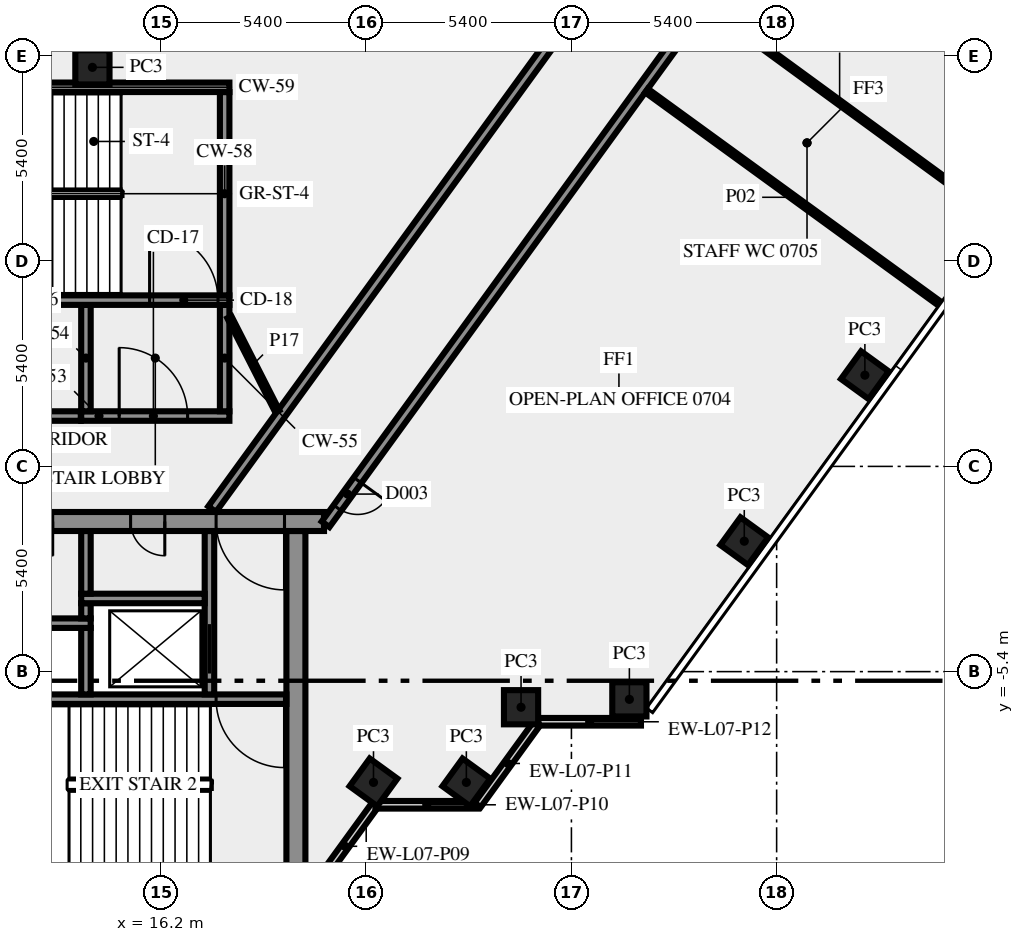
"""IFC4 building model, lengths in metres.
Left out: names, types, materials, properties, quantities, classifications, styles, units other than length and angle.
Written with IfcOpenShell. Run it as: python <this file> out.ifc"""

import sys

from ifc_helpers import new_model, si_unit, direction, frame, frame_2d, origin, origin_2d, place, context, subcontext, project, spatial, rectangle, extrude, element, fill, save


model = new_model("IFC4")
c1 = context("Model", 3, precision=1e-05, world=origin(), true_north=direction((0.0, 1.0)))
c2 = subcontext(c1, "Body", "Model", "MODEL_VIEW")
j1 = project(units=[si_unit("LENGTHUNIT", "METRE"), si_unit("PLANEANGLEUNIT", "RADIAN")], contexts=[c1])
p1 = place(None, origin())
s1 = spatial("IfcSite", under=j1, at=p1, CompositionType="ELEMENT")
p2 = place(p1, origin())
s2 = spatial("IfcBuilding", under=s1, at=p2, CompositionType="ELEMENT")
p3 = place(p2, frame((0.0, 0.0, 35.0)))
s3 = spatial("IfcBuildingStorey", under=s2, at=p3, CompositionType="ELEMENT", Elevation=35.0)
for number, where, z_axis, x_axis in (
    (1, (21.792, -8.315, 0.0), (0.0, 0.0, 1.0), (0.588, 0.809, 0.0)),
    (2, (24.235, -8.315, 0.0), (0.0, 0.0, 1.0), (0.588, 0.809, 0.0)),
    (3, (25.674, -6.337, 0.0), (0.0, 0.0, 1.0), (1.0, 0.0, 0.0)),
    (4, (28.525, -6.13, 0.0), (0.0, 0.0, 1.0), (1.0, 0.0, 0.0)),
    (5, (31.548, -1.969, 0.0), (0.0, 0.0, 1.0), (0.588, 0.809, 0.0)),
    (6, (34.722, 2.4, 0.0), (0.0, 0.0, 1.0), (0.588, 0.809, 0.0)),
    (7, (14.395, 10.5, 0.0), (0.0, 0.0, 1.0), (-1.0, 0.0, 0.0)),
):
    element("IfcColumn", number, at=place(p3, frame(where, z_axis=z_axis, x_axis=x_axis)), inside=s3, PredefinedType="COLUMN", context=c2, shape_type="SweptSolid", body=[
        extrude(rectangle(XDim=0.9, YDim=0.9, at=origin_2d()), origin(), (0.0, 0.0, 1.0), 3.65),
    ])
p4 = place(p3, frame((20.253, -11.083, 0.0), z_axis=(0.0, 0.0, 1.0), x_axis=(0.587766567315, 0.809030569476, 0.0)))
e8 = element("IfcWall", 8, at=p4, inside=s3, PredefinedType="SOLIDWALL", context=c2, shape_type="SweptSolid", body=[
    extrude(rectangle(XDim=2.688, YDim=0.2, at=frame_2d((1.344, 0.0))), origin(), (0.0, 0.0, 1.0), 3.65),
])
p5 = place(p3, frame((21.843, -8.904, 0.0), z_axis=(0.0, 0.0, 1.0), x_axis=(1.0, 0.0, 0.0)))
e9 = element("IfcWall", 9, at=p5, inside=s3, PredefinedType="SOLIDWALL", context=c2, shape_type="SweptSolid", body=[
    extrude(rectangle(XDim=2.7, YDim=0.2, at=frame_2d((1.35, 0.0))), origin(), (0.0, 0.0, 1.0), 3.65),
])
p6 = place(p3, frame((24.533, -8.909, 0.0), z_axis=(0.0, 0.0, 1.0), x_axis=(0.587720002413, 0.809064397168, 0.0)))
e10 = element("IfcWall", 10, at=p6, inside=s3, PredefinedType="SOLIDWALL", context=c2, shape_type="SweptSolid", body=[
    extrude(rectangle(XDim=2.7, YDim=0.2, at=frame_2d((1.35, 0.0))), origin(), (0.0, 0.0, 1.0), 3.65),
])
p7 = place(p3, frame((26.13, -6.719, 0.0), z_axis=(0.0, 0.0, 1.0), x_axis=(1.0, 0.0, 0.0)))
e11 = element("IfcWall", 11, at=p7, inside=s3, PredefinedType="SOLIDWALL", context=c2, shape_type="SweptSolid", body=[
    extrude(rectangle(XDim=2.7, YDim=0.2, at=frame_2d((1.35, 0.0))), origin(), (0.0, 0.0, 1.0), 3.65),
])
p8 = place(p3, frame((19.75, -10.5, 0.0), z_axis=(0.0, 0.0, 1.0), x_axis=(0.0, 1.0, 0.0)))
e12 = element("IfcWall", 12, at=p8, inside=s3, PredefinedType="SHEAR", context=c2, shape_type="SweptSolid", body=[
    extrude(rectangle(XDim=8.8, YDim=0.5, at=frame_2d((4.4, 0.0))), origin(), (0.0, 0.0, 1.0), 3.65),
])
p9 = place(p3, frame((19.5, -6.125, 0.0), z_axis=(0.0, 0.0, 1.0), x_axis=(-1.0, 0.0, 0.0)))
e13 = element("IfcWall", 13, at=p9, inside=s3, PredefinedType="SHEAR", context=c2, shape_type="SweptSolid", body=[
    extrude(rectangle(XDim=8.05, YDim=0.25, at=frame_2d((4.025, 0.0))), origin(), (0.0, 0.0, 1.0), 3.65),
])
p10 = place(p9, frame((0.05, 0.0, 0.0)))
e14 = element("IfcOpeningElement", 14, at=p10, cuts=e13, PredefinedType="OPENING", context=c2, shape_type="SweptSolid", body=[
    extrude(rectangle(XDim=1.8, YDim=2.1, at=frame_2d((0.9, 1.05))), frame((0.0, 0.135, 0.0), z_axis=(0.0, -1.0, 0.0), x_axis=(1.0, 0.0, 0.0)), (0.0, 0.0, 1.0), 0.27),
])
p11 = place(p3, frame((14.225, -6.0, 0.0), z_axis=(0.0, 0.0, 1.0), x_axis=(0.0, 1.0, 0.0)))
e15 = element("IfcWall", 15, at=p11, inside=s3, PredefinedType="SHEAR", context=c2, shape_type="SweptSolid", body=[
    extrude(rectangle(XDim=1.75, YDim=0.25, at=frame_2d((0.875, 0.0))), origin(), (0.0, 0.0, 1.0), 3.65),
])
p12 = place(p3, frame((17.475, -6.0, 0.0), z_axis=(0.0, 0.0, 1.0), x_axis=(0.0, 1.0, 0.0)))
e16 = element("IfcWall", 16, at=p12, inside=s3, PredefinedType="SHEAR", context=c2, shape_type="SweptSolid", body=[
    extrude(rectangle(XDim=4.3, YDim=0.25, at=frame_2d((2.15, 0.0))), origin(), (0.0, 0.0, 1.0), 3.65),
])
p13 = place(p12, frame((0.55, 0.0, 0.0)))
e17 = element("IfcOpeningElement", 17, at=p13, cuts=e16, PredefinedType="OPENING", context=c2, shape_type="SweptSolid", body=[
    extrude(rectangle(XDim=1.3, YDim=2.1, at=frame_2d((0.65, 1.05))), frame((0.0, 0.135, 0.0), z_axis=(0.0, -1.0, 0.0), x_axis=(1.0, 0.0, 0.0)), (0.0, 0.0, 1.0), 0.27),
])
p14 = place(p3, frame((-0.6, -4.125, 0.0), z_axis=(0.0, 0.0, 1.0), x_axis=(1.0, 0.0, 0.0)))
e18 = element("IfcWall", 18, at=p14, inside=s3, PredefinedType="SHEAR", context=c2, shape_type="SweptSolid", body=[
    extrude(rectangle(XDim=14.95, YDim=0.25, at=frame_2d((7.475, 0.0))), origin(), (0.0, 0.0, 1.0), 3.65),
])
p15 = place(p14, frame((2.75, 0.0, 0.0)))
e19 = element("IfcOpeningElement", 19, at=p15, cuts=e18, PredefinedType="OPENING", context=c2, shape_type="SweptSolid", body=[
    extrude(rectangle(XDim=1.3, YDim=2.1, at=frame_2d((0.65, 1.05))), frame((0.0, 0.135, 0.0), z_axis=(0.0, -1.0, 0.0), x_axis=(1.0, 0.0, 0.0)), (0.0, 0.0, 1.0), 0.27),
])
p16 = place(p3, frame((14.225, -4.0, 0.0), z_axis=(0.0, 0.0, 1.0), x_axis=(0.0, 1.0, 0.0)))
e20 = element("IfcWall", 20, at=p16, inside=s3, PredefinedType="SHEAR", context=c2, shape_type="SweptSolid", body=[
    extrude(rectangle(XDim=0.4, YDim=0.25, at=frame_2d((0.2, 0.0))), origin(), (0.0, 0.0, 1.0), 3.65),
])
p17 = place(p3, frame((14.1, -3.475, 0.0), z_axis=(0.0, 0.0, 1.0), x_axis=(1.0, 0.0, 0.0)))
e21 = element("IfcWall", 21, at=p17, inside=s3, PredefinedType="SHEAR", context=c2, shape_type="SweptSolid", body=[
    extrude(rectangle(XDim=3.25, YDim=0.25, at=frame_2d((1.625, 0.0))), origin(), (0.0, 0.0, 1.0), 3.65),
])
p18 = place(p3, frame((14.225, -3.35, 0.0), z_axis=(0.0, 0.0, 1.0), x_axis=(0.0, 1.0, 0.0)))
e22 = element("IfcWall", 22, at=p18, inside=s3, PredefinedType="SHEAR", context=c2, shape_type="SweptSolid", body=[
    extrude(rectangle(XDim=1.65, YDim=0.25, at=frame_2d((0.825, 0.0))), origin(), (0.0, 0.0, 1.0), 3.65),
])
p19 = place(p3, frame((20.49, -1.45, 0.0), z_axis=(0.0, 0.0, 1.0), x_axis=(-1.0, 0.0, 0.0)))
e23 = element("IfcWall", 23, at=p19, inside=s3, PredefinedType="SHEAR", context=c2, shape_type="SweptSolid", body=[
    extrude(rectangle(XDim=40.98, YDim=0.5, at=frame_2d((20.49, 0.0))), origin(), (0.0, 0.0, 1.0), 3.65),
])
p20 = place(p19, frame((38.14, 0.0, 0.0)))
e24 = element("IfcOpeningElement", 24, at=p20, cuts=e23, PredefinedType="OPENING", context=c2, shape_type="SweptSolid", body=[
    extrude(rectangle(XDim=1.8, YDim=2.1, at=frame_2d((0.9, 1.05))), frame((0.0, 0.26, 0.0), z_axis=(0.0, -1.0, 0.0), x_axis=(1.0, 0.0, 0.0)), (0.0, 0.0, 1.0), 0.52),
])
p21 = place(p19, frame((36.728, 0.0, 0.0)))
e25 = element("IfcOpeningElement", 25, at=p21, cuts=e23, PredefinedType="OPENING", context=c2, shape_type="SweptSolid", body=[
    extrude(rectangle(XDim=0.8, YDim=2.1, at=frame_2d((0.4, 1.05))), frame((0.0, 0.26, 0.0), z_axis=(0.0, -1.0, 0.0), x_axis=(1.0, 0.0, 0.0)), (0.0, 0.0, 1.0), 0.52),
])
p22 = place(p19, frame((35.153, 0.0, 0.0)))
e26 = element("IfcOpeningElement", 26, at=p22, cuts=e23, PredefinedType="OPENING", context=c2, shape_type="SweptSolid", body=[
    extrude(rectangle(XDim=0.8, YDim=2.1, at=frame_2d((0.4, 1.05))), frame((0.0, 0.26, 0.0), z_axis=(0.0, -1.0, 0.0), x_axis=(1.0, 0.0, 0.0)), (0.0, 0.0, 1.0), 0.52),
])
p23 = place(p19, frame((32.94, 0.0, 0.0)))
e27 = element("IfcOpeningElement", 27, at=p23, cuts=e23, PredefinedType="OPENING", context=c2, shape_type="SweptSolid", body=[
    extrude(rectangle(XDim=0.9, YDim=2.1, at=frame_2d((0.45, 1.05))), frame((0.0, 0.26, 0.0), z_axis=(0.0, -1.0, 0.0), x_axis=(1.0, 0.0, 0.0)), (0.0, 0.0, 1.0), 0.52),
])
p24 = place(p19, frame((21.765, 0.0, 0.0)))
e28 = element("IfcOpeningElement", 28, at=p24, cuts=e23, PredefinedType="OPENING", context=c2, shape_type="SweptSolid", body=[
    extrude(rectangle(XDim=2.0, YDim=2.1, at=frame_2d((1.0, 1.05))), frame((0.0, 0.26, 0.0), z_axis=(0.0, -1.0, 0.0), x_axis=(1.0, 0.0, 0.0)), (0.0, 0.0, 1.0), 0.52),
])
p25 = place(p19, frame((7.14, 0.0, 0.0)))
e29 = element("IfcOpeningElement", 29, at=p25, cuts=e23, PredefinedType="OPENING", context=c2, shape_type="SweptSolid", body=[
    extrude(rectangle(XDim=0.9, YDim=2.1, at=frame_2d((0.45, 1.05))), frame((0.0, 0.26, 0.0), z_axis=(0.0, -1.0, 0.0), x_axis=(1.0, 0.0, 0.0)), (0.0, 0.0, 1.0), 0.52),
])
p26 = place(p19, frame((4.19, 0.0, 0.0)))
e30 = element("IfcOpeningElement", 30, at=p26, cuts=e23, PredefinedType="OPENING", context=c2, shape_type="SweptSolid", body=[
    extrude(rectangle(XDim=0.9, YDim=2.1, at=frame_2d((0.45, 1.05))), frame((0.0, 0.26, 0.0), z_axis=(0.0, -1.0, 0.0), x_axis=(1.0, 0.0, 0.0)), (0.0, 0.0, 1.0), 0.52),
])
p27 = place(p19, frame((1.04, 0.0, 0.0)))
e31 = element("IfcOpeningElement", 31, at=p27, cuts=e23, PredefinedType="OPENING", context=c2, shape_type="SweptSolid", body=[
    extrude(rectangle(XDim=1.8, YDim=2.1, at=frame_2d((0.9, 1.05))), frame((0.0, 0.26, 0.0), z_axis=(0.0, -1.0, 0.0), x_axis=(1.0, 0.0, 0.0)), (0.0, 0.0, 1.0), 0.52),
])
p28 = place(p3, frame((14.1, 1.325, 0.0), z_axis=(0.0, 0.0, 1.0), x_axis=(1.0, 0.0, 0.0)))
e32 = element("IfcWall", 32, at=p28, inside=s3, PredefinedType="SHEAR", context=c2, shape_type="SweptSolid", body=[
    extrude(rectangle(XDim=3.9, YDim=0.25, at=frame_2d((1.95, 0.0))), origin(), (0.0, 0.0, 1.0), 3.65),
])
p29 = place(p28, frame((1.0, 0.0, 0.0)))
e33 = element("IfcOpeningElement", 33, at=p29, cuts=e32, PredefinedType="OPENING", context=c2, shape_type="SweptSolid", body=[
    extrude(rectangle(XDim=1.8, YDim=2.1, at=frame_2d((0.9, 1.05))), frame((0.0, 0.135, 0.0), z_axis=(0.0, -1.0, 0.0), x_axis=(1.0, 0.0, 0.0)), (0.0, 0.0, 1.0), 0.27),
])
for number, where, z_axis, x_axis in (
    (34, (14.225, 1.45, 0.0), (0.0, 0.0, 1.0), (0.0, 1.0, 0.0)),
    (35, (17.875, 1.45, 0.0), (0.0, 0.0, 1.0), (0.0, 1.0, 0.0)),
):
    element("IfcWall", number, at=place(p3, frame(where, z_axis=z_axis, x_axis=x_axis)), inside=s3, PredefinedType="SHEAR", context=c2, shape_type="SweptSolid", body=[
        extrude(rectangle(XDim=2.8, YDim=0.25, at=frame_2d((1.4, 0.0))), origin(), (0.0, 0.0, 1.0), 3.65),
    ])
p30 = place(p3, frame((7.5, 4.375, 0.0), z_axis=(0.0, 0.0, 1.0), x_axis=(1.0, 0.0, 0.0)))
e36 = element("IfcWall", 36, at=p30, inside=s3, PredefinedType="SHEAR", context=c2, shape_type="SweptSolid", body=[
    extrude(rectangle(XDim=10.5, YDim=0.25, at=frame_2d((5.25, 0.0))), origin(), (0.0, 0.0, 1.0), 3.65),
])
p31 = place(p30, frame((8.4, 0.0, 0.0)))
e37 = element("IfcOpeningElement", 37, at=p31, cuts=e36, PredefinedType="OPENING", context=c2, shape_type="SweptSolid", body=[
    extrude(rectangle(XDim=1.8, YDim=2.1, at=frame_2d((0.9, 1.05))), frame((0.0, 0.135, 0.0), z_axis=(0.0, -1.0, 0.0), x_axis=(1.0, 0.0, 0.0)), (0.0, 0.0, 1.0), 0.27),
])
p32 = place(p3, frame((17.875, 4.5, 0.0), z_axis=(0.0, 0.0, 1.0), x_axis=(0.0, 1.0, 0.0)))
e38 = element("IfcWall", 38, at=p32, inside=s3, PredefinedType="SHEAR", context=c2, shape_type="SweptSolid", body=[
    extrude(rectangle(XDim=5.35, YDim=0.25, at=frame_2d((2.675, 0.0))), origin(), (0.0, 0.0, 1.0), 3.65),
])
p33 = place(p3, frame((7.5, 9.975, 0.0), z_axis=(0.0, 0.0, 1.0), x_axis=(1.0, 0.0, 0.0)))
e39 = element("IfcWall", 39, at=p33, inside=s3, PredefinedType="SHEAR", context=c2, shape_type="SweptSolid", body=[
    extrude(rectangle(XDim=10.5, YDim=0.25, at=frame_2d((5.25, 0.0))), origin(), (0.0, 0.0, 1.0), 3.65),
])
p34 = place(p33, frame((2.0, 0.0, 1.0)))
e40 = element("IfcOpeningElement", 40, at=p34, cuts=e39, PredefinedType="OPENING", context=c2, shape_type="SweptSolid", body=[
    extrude(rectangle(XDim=1.2, YDim=1.2, at=frame_2d((0.6, 0.6))), frame((0.0, 0.135, 0.0), z_axis=(0.0, -1.0, 0.0), x_axis=(1.0, 0.0, 0.0)), (0.0, 0.0, 1.0), 0.27),
])
p35 = place(p3, frame((-14.09, 1.325, 0.0), z_axis=(0.0, 0.0, 1.0), x_axis=(1.0, 0.0, 0.0)))
e41 = element("IfcWall", 41, at=p35, inside=s3, PredefinedType="SOLIDWALL", context=c2, shape_type="SweptSolid", body=[
    extrude(rectangle(XDim=28.18, YDim=0.25, at=frame_2d((14.09, 0.0))), origin(), (0.0, 0.0, 1.0), 3.65),
])
p36 = place(p35, frame((17.319, 0.0, 0.0)))
e42 = element("IfcOpeningElement", 42, at=p36, cuts=e41, PredefinedType="OPENING", context=c2, shape_type="SweptSolid", body=[
    extrude(rectangle(XDim=0.9, YDim=2.1, at=frame_2d((0.45, 1.05))), frame((0.0, 0.135, 0.0), z_axis=(0.0, -1.0, 0.0), x_axis=(1.0, 0.0, 0.0)), (0.0, 0.0, 1.0), 0.27),
])
p37 = place(p35, frame((14.44, 0.0, 0.0)))
e43 = element("IfcOpeningElement", 43, at=p37, cuts=e41, PredefinedType="OPENING", context=c2, shape_type="SweptSolid", body=[
    extrude(rectangle(XDim=0.9, YDim=2.1, at=frame_2d((0.45, 1.05))), frame((0.0, 0.135, 0.0), z_axis=(0.0, -1.0, 0.0), x_axis=(1.0, 0.0, 0.0)), (0.0, 0.0, 1.0), 0.27),
])
p38 = place(p35, frame((0.34, 0.0, 0.0)))
e44 = element("IfcOpeningElement", 44, at=p38, cuts=e41, PredefinedType="OPENING", context=c2, shape_type="SweptSolid", body=[
    extrude(rectangle(XDim=0.9, YDim=2.1, at=frame_2d((0.45, 1.05))), frame((0.0, 0.135, 0.0), z_axis=(0.0, -1.0, 0.0), x_axis=(1.0, 0.0, 0.0)), (0.0, 0.0, 1.0), 0.27),
])
p39 = place(p3, frame((17.545, -1.125, 0.0), z_axis=(0.0, 0.0, 1.0), x_axis=(0.587786323093, 0.809016216391, 0.0)))
e45 = element("IfcWall", 45, at=p39, inside=s3, PredefinedType="SOLIDWALL", context=c2, shape_type="SweptSolid", body=[
    extrude(rectangle(XDim=33.493, YDim=0.25, at=frame_2d((16.747, 0.0))), origin(), (0.0, 0.0, 1.0), 3.65),
])
p40 = place(p39, frame((25.857, 0.0, 0.0)))
e46 = element("IfcOpeningElement", 46, at=p40, cuts=e45, PredefinedType="OPENING", context=c2, shape_type="SweptSolid", body=[
    extrude(rectangle(XDim=0.9, YDim=2.1, at=frame_2d((0.45, 1.05))), frame((0.0, 0.135, 0.0), z_axis=(0.0, -1.0, 0.0), x_axis=(1.0, 0.0, 0.0)), (0.0, 0.0, 1.0), 0.27),
])
p41 = place(p39, frame((24.157, 0.0, 0.0)))
e47 = element("IfcOpeningElement", 47, at=p41, cuts=e45, PredefinedType="OPENING", context=c2, shape_type="SweptSolid", body=[
    extrude(rectangle(XDim=1.0, YDim=2.1, at=frame_2d((0.5, 1.05))), frame((0.0, 0.135, 0.0), z_axis=(0.0, -1.0, 0.0), x_axis=(1.0, 0.0, 0.0)), (0.0, 0.0, 1.0), 0.27),
])
p42 = place(p3, frame((43.467, 30.045, 0.0), z_axis=(0.0, 0.0, 1.0), x_axis=(-0.587784726077, -0.809017376692, 0.0)))
e48 = element("IfcWall", 48, at=p42, inside=s3, PredefinedType="SOLIDWALL", context=c2, shape_type="SweptSolid", body=[
    extrude(rectangle(XDim=39.02, YDim=0.25, at=frame_2d((19.51, 0.0))), origin(), (0.0, 0.0, 1.0), 3.65),
])
p43 = place(p42, frame((37.588, 0.0, 0.0)))
e49 = element("IfcOpeningElement", 49, at=p43, cuts=e48, PredefinedType="OPENING", context=c2, shape_type="SweptSolid", body=[
    extrude(rectangle(XDim=0.9, YDim=2.1, at=frame_2d((0.45, 1.05))), frame((0.0, 0.135, 0.0), z_axis=(0.0, -1.0, 0.0), x_axis=(1.0, 0.0, 0.0)), (0.0, 0.0, 1.0), 0.27),
])
p44 = place(p42, frame((20.855, 0.0, 0.0)))
e50 = element("IfcOpeningElement", 50, at=p44, cuts=e48, PredefinedType="OPENING", context=c2, shape_type="SweptSolid", body=[
    extrude(rectangle(XDim=0.9, YDim=2.1, at=frame_2d((0.45, 1.05))), frame((0.0, 0.135, 0.0), z_axis=(0.0, -1.0, 0.0), x_axis=(1.0, 0.0, 0.0)), (0.0, 0.0, 1.0), 0.27),
])
p45 = place(p42, frame((7.355, 0.0, 0.0)))
e51 = element("IfcOpeningElement", 51, at=p45, cuts=e48, PredefinedType="OPENING", context=c2, shape_type="SweptSolid", body=[
    extrude(rectangle(XDim=0.9, YDim=2.1, at=frame_2d((0.45, 1.05))), frame((0.0, 0.135, 0.0), z_axis=(0.0, -1.0, 0.0), x_axis=(1.0, 0.0, 0.0)), (0.0, 0.0, 1.0), 0.27),
])
p46 = place(p42, frame((11.404, 0.0, 0.0)))
e52 = element("IfcOpeningElement", 52, at=p46, cuts=e48, PredefinedType="OPENING", context=c2, shape_type="SweptSolid", body=[
    extrude(rectangle(XDim=0.9, YDim=2.1, at=frame_2d((0.45, 1.05))), frame((0.0, 0.135, 0.0), z_axis=(0.0, -1.0, 0.0), x_axis=(1.0, 0.0, 0.0)), (0.0, 0.0, 1.0), 0.27),
])
p47 = place(p42, frame((0.604, 0.0, 0.0)))
e53 = element("IfcOpeningElement", 53, at=p47, cuts=e48, PredefinedType="OPENING", context=c2, shape_type="SweptSolid", body=[
    extrude(rectangle(XDim=0.9, YDim=2.1, at=frame_2d((0.45, 1.05))), frame((0.0, 0.135, 0.0), z_axis=(0.0, -1.0, 0.0), x_axis=(1.0, 0.0, 0.0)), (0.0, 0.0, 1.0), 0.27),
])
p48 = place(p42, frame((22.455, 0.0, 0.0)))
e54 = element("IfcOpeningElement", 54, at=p48, cuts=e48, PredefinedType="OPENING", context=c2, shape_type="SweptSolid", body=[
    extrude(rectangle(XDim=0.9, YDim=2.1, at=frame_2d((0.45, 1.05))), frame((0.0, 0.135, 0.0), z_axis=(0.0, -1.0, 0.0), x_axis=(1.0, 0.0, 0.0)), (0.0, 0.0, 1.0), 0.27),
])
p49 = place(p3, frame((36.702, 4.274, 0.0), z_axis=(0.0, 0.0, 1.0), x_axis=(-0.808998008689, 0.58781138296, 0.0)))
e55 = element("IfcWall", 55, at=p49, inside=s3, PredefinedType="PARTITIONING", context=c2, shape_type="SweptSolid", body=[
    extrude(rectangle(XDim=9.55, YDim=0.12, at=frame_2d((4.775, 0.0))), origin(), (0.0, 0.0, 1.0), 2.75),
])
p50 = place(p3, frame((30.587, 12.104, 0.0), z_axis=(0.0, 0.0, 1.0), x_axis=(0.807590933527, -0.589743066161, 0.0)))
e56 = element("IfcWall", 56, at=p50, inside=s3, PredefinedType="PARTITIONING", context=c2, shape_type="SweptSolid", body=[
    extrude(rectangle(XDim=8.594, YDim=0.12, at=frame_2d((4.297, 0.0))), origin(), (0.0, 0.0, 1.0), 3.65),
])
p51 = place(p3, frame((18.0, 3.925, 0.0), z_axis=(0.0, 0.0, 1.0), x_axis=(0.453950796792, -0.891026752736, 0.0)))
e57 = element("IfcWall", 57, at=p51, inside=s3, PredefinedType="PARTITIONING", context=c2, shape_type="SweptSolid", body=[
    extrude(rectangle(XDim=2.778, YDim=0.12, at=frame_2d((1.389, 0.0))), origin(), (0.0, 0.0, 1.0), 3.65),
])
p52 = place(p10, origin())
e58 = element("IfcDoor", 58, at=p52, inside=s3, OperationType="DOUBLE_DOOR_SINGLE_SWING", PredefinedType="DOOR", context=c2, shape_type="SweptSolid", body=[
    extrude(rectangle(XDim=1.8, YDim=2.1, at=frame_2d((0.9, 1.05))), frame((0.0, 0.025, 0.0), z_axis=(0.0, -1.0, 0.0), x_axis=(1.0, 0.0, 0.0)), (0.0, 0.0, 1.0), 0.05),
])
fill(e14, e58)
p53 = place(p13, origin())
e59 = element("IfcDoor", 59, at=p53, inside=s3, OperationType="DOUBLE_DOOR_SLIDING", PredefinedType="DOOR", context=c2, shape_type="SweptSolid", body=[
    extrude(rectangle(XDim=1.3, YDim=2.1, at=frame_2d((0.65, 1.05))), frame((0.0, 0.025, 0.0), z_axis=(0.0, -1.0, 0.0), x_axis=(1.0, 0.0, 0.0)), (0.0, 0.0, 1.0), 0.05),
])
fill(e17, e59)
p54 = place(p26, origin())
e60 = element("IfcDoor", 60, at=p54, inside=s3, OperationType="SINGLE_SWING_LEFT", PredefinedType="DOOR", context=c2, shape_type="SweptSolid", body=[
    extrude(rectangle(XDim=0.9, YDim=2.1, at=frame_2d((0.45, 1.05))), frame((0.0, 0.025, 0.0), z_axis=(0.0, -1.0, 0.0), x_axis=(1.0, 0.0, 0.0)), (0.0, 0.0, 1.0), 0.05),
])
fill(e30, e60)
p55 = place(p27, origin())
e61 = element("IfcDoor", 61, at=p55, inside=s3, OperationType="DOUBLE_DOOR_SINGLE_SWING", PredefinedType="DOOR", context=c2, shape_type="SweptSolid", body=[
    extrude(rectangle(XDim=1.8, YDim=2.1, at=frame_2d((0.9, 1.05))), frame((0.0, 0.025, 0.0), z_axis=(0.0, -1.0, 0.0), x_axis=(1.0, 0.0, 0.0)), (0.0, 0.0, 1.0), 0.05),
])
fill(e31, e61)
p56 = place(p29, origin())
e62 = element("IfcDoor", 62, at=p56, inside=s3, OperationType="DOUBLE_DOOR_SINGLE_SWING", PredefinedType="DOOR", context=c2, shape_type="SweptSolid", body=[
    extrude(rectangle(XDim=1.8, YDim=2.1, at=frame_2d((0.9, 1.05))), frame((0.0, 0.025, 0.0), z_axis=(0.0, -1.0, 0.0), x_axis=(1.0, 0.0, 0.0)), (0.0, 0.0, 1.0), 0.05),
])
fill(e33, e62)
p57 = place(p31, origin())
e63 = element("IfcDoor", 63, at=p57, inside=s3, OperationType="DOUBLE_DOOR_SINGLE_SWING", PredefinedType="DOOR", context=c2, shape_type="SweptSolid", body=[
    extrude(rectangle(XDim=1.8, YDim=2.1, at=frame_2d((0.9, 1.05))), frame((0.0, 0.025, 0.0), z_axis=(0.0, -1.0, 0.0), x_axis=(1.0, 0.0, 0.0)), (0.0, 0.0, 1.0), 0.05),
])
fill(e37, e63)
p58 = place(p43, origin())
e64 = element("IfcDoor", 64, at=p58, inside=s3, OperationType="SINGLE_SWING_RIGHT", PredefinedType="DOOR", context=c2, shape_type="SweptSolid", body=[
    extrude(rectangle(XDim=0.9, YDim=2.1, at=frame_2d((0.45, 1.05))), frame((0.0, 0.025, 0.0), z_axis=(0.0, -1.0, 0.0), x_axis=(1.0, 0.0, 0.0)), (0.0, 0.0, 1.0), 0.05),
])
fill(e49, e64)
save(model, sys.argv[1])
